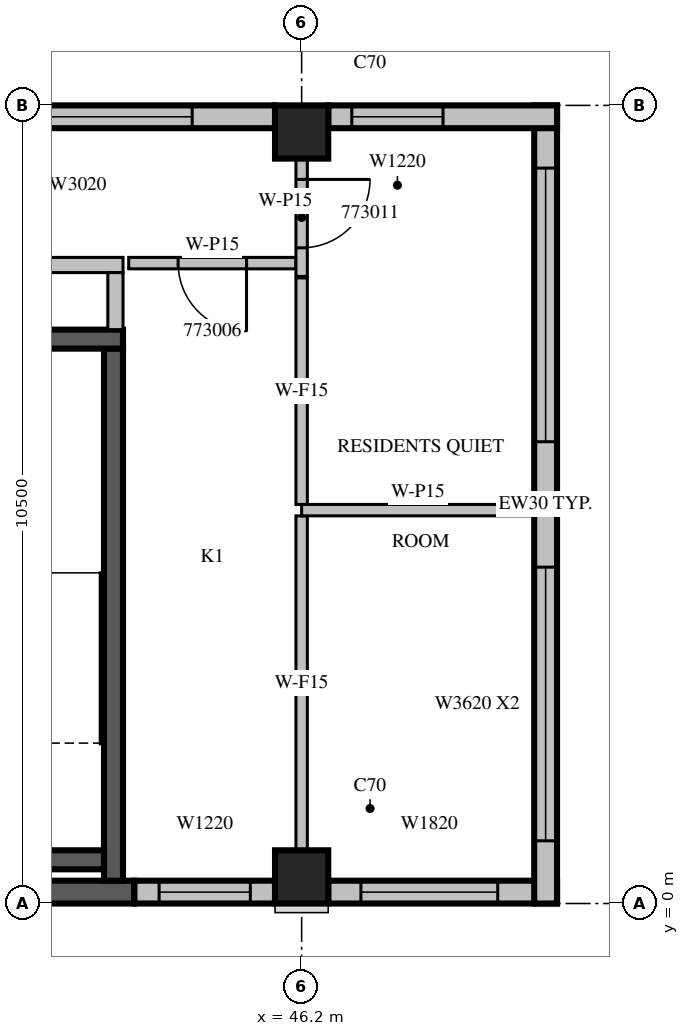
"""IFC4 building model, lengths in metres.
Left out: names, types, materials, properties, quantities, classifications, styles, units other than length and angle.
Written with IfcOpenShell. Run it as: python <this file> out.ifc"""

import sys

from ifc_helpers import new_model, si_unit, direction, frame, frame_2d, origin, origin_2d, place, context, subcontext, project, spatial, rectangle, extrude, source, transform, mapped, element, fill, save


model = new_model("IFC4")
c1 = context("Model", 3, precision=1e-05, world=origin(), true_north=direction((0.0, 1.0)))
c2 = subcontext(c1, "Body", "Model", "MODEL_VIEW")
j1 = project(units=[si_unit("LENGTHUNIT", "METRE"), si_unit("PLANEANGLEUNIT", "RADIAN")], contexts=[c1])
p1 = place(None, origin())
s1 = spatial("IfcSite", under=j1, at=p1, CompositionType="ELEMENT")
p2 = place(p1, origin())
s2 = spatial("IfcBuilding", under=s1, at=p2, CompositionType="ELEMENT")
p3 = place(p2, frame((0.0, 0.0, 316.0)))
s3 = spatial("IfcBuildingStorey", under=s2, at=p3, CompositionType="ELEMENT", Elevation=316.0)
m1 = source(origin(), c2, "Body", "SweptSolid", [
    extrude(rectangle(XDim=0.7, YDim=0.7, at=origin_2d()), origin(), (0.0, 0.0, 1.0), 3.5),
])
for number, where, z_axis, x_axis in (
    (1, (46.2, 0.35, 0.0), (0.0, 0.0, 1.0), (1.0, 0.0, 0.0)),
    (2, (46.2, 10.15, 0.0), (0.0, 0.0, 1.0), (1.0, 0.0, 0.0)),
):
    element("IfcColumn", number, at=place(p3, frame(where, z_axis=z_axis, x_axis=x_axis)), inside=s3, PredefinedType="COLUMN", context=c2, shape_type="MappedRepresentation", body=[
        mapped(m1, transform((0.0, 0.0, 0.0), scale=1.0)),
    ])
m2 = source(origin(), c2, "Body", "SweptSolid", [
    extrude(rectangle(XDim=3.8, YDim=0.3, at=frame_2d((1.9, 0.0))), origin(), (0.0, 0.0, 1.0), 3.1),
])
p4 = place(p3, frame((40.2, 0.15, 0.0), z_axis=(0.0, 0.0, 1.0), x_axis=(1.0, 0.0, 0.0)))
e3 = element("IfcWall", 3, at=p4, inside=s3, PredefinedType="SOLIDWALL", context=c2, shape_type="MappedRepresentation", body=[
    mapped(m2, transform((0.0, 0.0, 0.0), scale=1.0)),
])
m3 = source(origin(), c2, "Body", "SweptSolid", [
    extrude(rectangle(XDim=1.85, YDim=0.3, at=frame_2d((0.925, 0.0))), origin(), (0.0, 0.0, 1.0), 3.1),
])
p5 = place(p3, frame((44.0, 0.15, 0.0), z_axis=(0.0, 0.0, 1.0), x_axis=(1.0, 0.0, 0.0)))
e4 = element("IfcWall", 4, at=p5, inside=s3, PredefinedType="STANDARD", context=c2, shape_type="MappedRepresentation", body=[
    mapped(m3, transform((0.0, 0.0, 0.0), scale=1.0)),
])
m4 = source(origin(), c2, "Body", "SweptSolid", [
    extrude(rectangle(XDim=1.2, YDim=2.0, at=frame_2d((0.6, 1.0))), frame((0.0, 0.16, 0.0), z_axis=(0.0, -1.0, 0.0), x_axis=(1.0, 0.0, 0.0)), (0.0, 0.0, 1.0), 0.32),
])
p6 = place(p5, frame((0.325, 0.0, 0.6)))
e5 = element("IfcOpeningElement", 5, at=p6, cuts=e4, PredefinedType="OPENING", context=c2, shape_type="MappedRepresentation", body=[
    mapped(m4, transform((0.0, 0.0, 0.0), scale=1.0)),
])
m5 = source(origin(), c2, "Body", "SweptSolid", [
    extrude(rectangle(XDim=3.01, YDim=0.3, at=frame_2d((1.505, 0.0))), origin(), (0.0, 0.0, 1.0), 3.1),
])
p7 = place(p3, frame((46.55, 0.15, 0.0), z_axis=(0.0, 0.0, 1.0), x_axis=(1.0, 0.0, 0.0)))
e6 = element("IfcWall", 6, at=p7, inside=s3, PredefinedType="STANDARD", context=c2, shape_type="MappedRepresentation", body=[
    mapped(m5, transform((0.0, 0.0, 0.0), scale=1.0)),
])
m6 = source(origin(), c2, "Body", "SweptSolid", [
    extrude(rectangle(XDim=1.8, YDim=2.0, at=frame_2d((0.9, 1.0))), frame((0.0, 0.16, 0.0), z_axis=(0.0, -1.0, 0.0), x_axis=(1.0, 0.0, 0.0)), (0.0, 0.0, 1.0), 0.32),
])
p8 = place(p7, frame((0.43, 0.0, 0.6)))
e7 = element("IfcOpeningElement", 7, at=p8, cuts=e6, PredefinedType="OPENING", context=c2, shape_type="MappedRepresentation", body=[
    mapped(m6, transform((0.0, 0.0, 0.0), scale=1.0)),
])
m7 = source(origin(), c2, "Body", "SweptSolid", [
    extrude(rectangle(XDim=10.5, YDim=0.3, at=frame_2d((5.25, 0.0))), origin(), (0.0, 0.0, 1.0), 3.1),
])
p9 = place(p3, frame((49.41, 0.0, 0.0), z_axis=(0.0, 0.0, 1.0), x_axis=(0.0, 1.0, 0.0)))
e8 = element("IfcWall", 8, at=p9, inside=s3, PredefinedType="STANDARD", context=c2, shape_type="MappedRepresentation", body=[
    mapped(m7, transform((0.0, 0.0, 0.0), scale=1.0)),
])
m8 = source(origin(), c2, "Body", "SweptSolid", [
    extrude(rectangle(XDim=3.6, YDim=2.0, at=frame_2d((1.8, 1.0))), frame((0.0, 0.16, 0.0), z_axis=(0.0, -1.0, 0.0), x_axis=(1.0, 0.0, 0.0)), (0.0, 0.0, 1.0), 0.32),
])
p10 = place(p9, frame((0.825, 0.0, 0.6)))
e9 = element("IfcOpeningElement", 9, at=p10, cuts=e8, PredefinedType="OPENING", context=c2, shape_type="MappedRepresentation", body=[
    mapped(m8, transform((0.0, 0.0, 0.0), scale=1.0)),
])
p11 = place(p9, frame((6.075, 0.0, 0.6)))
e10 = element("IfcOpeningElement", 10, at=p11, cuts=e8, PredefinedType="OPENING", context=c2, shape_type="MappedRepresentation", body=[
    mapped(m8, transform((0.0, 0.0, 0.0), scale=1.0)),
])
p12 = place(p3, frame((49.56, 10.35, 0.0), z_axis=(0.0, 0.0, 1.0), x_axis=(-1.0, 0.0, 0.0)))
e11 = element("IfcWall", 11, at=p12, inside=s3, PredefinedType="STANDARD", context=c2, shape_type="MappedRepresentation", body=[
    mapped(m5, transform((0.0, 0.0, 0.0), scale=1.0)),
])
p13 = place(p12, frame((1.5, 0.0, 0.6)))
e12 = element("IfcOpeningElement", 12, at=p13, cuts=e11, PredefinedType="OPENING", context=c2, shape_type="MappedRepresentation", body=[
    mapped(m4, transform((0.0, 0.0, 0.0), scale=1.0)),
])
m9 = source(origin(), c2, "Body", "SweptSolid", [
    extrude(rectangle(XDim=7.7, YDim=0.3, at=frame_2d((3.85, 0.0))), origin(), (0.0, 0.0, 1.0), 3.1),
])
p14 = place(p3, frame((45.85, 10.35, 0.0), z_axis=(0.0, 0.0, 1.0), x_axis=(-1.0, 0.0, 0.0)))
e13 = element("IfcWall", 13, at=p14, inside=s3, PredefinedType="STANDARD", context=c2, shape_type="MappedRepresentation", body=[
    mapped(m9, transform((0.0, 0.0, 0.0), scale=1.0)),
])
m10 = source(origin(), c2, "Body", "SweptSolid", [
    extrude(rectangle(XDim=3.0, YDim=2.0, at=frame_2d((1.5, 1.0))), frame((0.0, 0.16, 0.0), z_axis=(0.0, -1.0, 0.0), x_axis=(1.0, 0.0, 0.0)), (0.0, 0.0, 1.0), 0.32),
])
p15 = place(p14, frame((1.09, 0.0, 0.6)))
e14 = element("IfcOpeningElement", 14, at=p15, cuts=e13, PredefinedType="OPENING", context=c2, shape_type="MappedRepresentation", body=[
    mapped(m10, transform((0.0, 0.0, 0.0), scale=1.0)),
])
p16 = place(p14, frame((6.19, 0.0, 0.6)))
e15 = element("IfcOpeningElement", 15, at=p16, cuts=e13, PredefinedType="OPENING", context=c2, shape_type="MappedRepresentation", body=[
    mapped(m4, transform((0.0, 0.0, 0.0), scale=1.0)),
])
m11 = source(origin(), c2, "Body", "SweptSolid", [
    extrude(rectangle(XDim=7.0, YDim=0.25, at=frame_2d((3.5, 0.0))), origin(), (0.0, 0.0, 1.0), 3.1),
])
p17 = place(p3, frame((43.725, 0.3, 0.0), z_axis=(0.0, 0.0, 1.0), x_axis=(0.0, 1.0, 0.0)))
e16 = element("IfcWall", 16, at=p17, inside=s3, PredefinedType="SOLIDWALL", context=c2, shape_type="MappedRepresentation", body=[
    mapped(m11, transform((0.0, 0.0, 0.0), scale=1.0)),
])
m12 = source(origin(), c2, "Body", "SweptSolid", [
    extrude(rectangle(XDim=3.45, YDim=0.25, at=frame_2d((1.725, 0.0))), origin(), (0.0, 0.0, 1.0), 3.1),
])
p18 = place(p3, frame((40.4, 7.425, 0.0), z_axis=(0.0, 0.0, 1.0), x_axis=(1.0, 0.0, 0.0)))
e17 = element("IfcWall", 17, at=p18, inside=s3, PredefinedType="SOLIDWALL", context=c2, shape_type="MappedRepresentation", body=[
    mapped(m12, transform((0.0, 0.0, 0.0), scale=1.0)),
])
m13 = source(origin(), c2, "Body", "SweptSolid", [
    extrude(rectangle(XDim=2.95, YDim=0.25, at=frame_2d((1.475, 0.0))), origin(), (0.0, 0.0, 1.0), 3.1),
])
p19 = place(p3, frame((40.65, 0.575, 0.0), z_axis=(0.0, 0.0, 1.0), x_axis=(1.0, 0.0, 0.0)))
e18 = element("IfcWall", 18, at=p19, inside=s3, PredefinedType="SOLIDWALL", context=c2, shape_type="MappedRepresentation", body=[
    mapped(m13, transform((0.0, 0.0, 0.0), scale=1.0)),
])
m14 = source(origin(), c2, "Body", "SweptSolid", [
    extrude(rectangle(XDim=5.45, YDim=0.2, at=frame_2d((2.725, 0.0))), origin(), (0.0, 0.0, 1.0), 3.1),
])
p20 = place(p3, frame((38.4, 8.4, 0.0), z_axis=(0.0, 0.0, 1.0), x_axis=(1.0, 0.0, 0.0)))
e19 = element("IfcWall", 19, at=p20, inside=s3, PredefinedType="PARTITIONING", context=c2, shape_type="MappedRepresentation", body=[
    mapped(m14, transform((0.0, 0.0, 0.0), scale=1.0)),
])
m15 = source(origin(), c2, "Body", "SweptSolid", [
    extrude(rectangle(XDim=1.2, YDim=2.1, at=frame_2d((0.6, 1.05))), frame((0.0, 0.11, 0.0), z_axis=(0.0, -1.0, 0.0), x_axis=(1.0, 0.0, 0.0)), (0.0, 0.0, 1.0), 0.22),
])
p21 = place(p20, frame((0.4, 0.0, 0.0)))
e20 = element("IfcOpeningElement", 20, at=p21, cuts=e19, PredefinedType="OPENING", context=c2, shape_type="MappedRepresentation", body=[
    mapped(m15, transform((0.0, 0.0, 0.0), scale=1.0)),
])
m16 = source(origin(), c2, "Body", "SweptSolid", [
    extrude(rectangle(XDim=0.9, YDim=2.1, at=frame_2d((0.45, 1.05))), frame((0.0, 0.11, 0.0), z_axis=(0.0, -1.0, 0.0), x_axis=(1.0, 0.0, 0.0)), (0.0, 0.0, 1.0), 0.22),
])
p22 = place(p20, frame((3.25, 0.0, 0.0)))
e21 = element("IfcOpeningElement", 21, at=p22, cuts=e19, PredefinedType="OPENING", context=c2, shape_type="MappedRepresentation", body=[
    mapped(m16, transform((0.0, 0.0, 0.0), scale=1.0)),
])
m17 = source(origin(), c2, "Body", "SweptSolid", [
    extrude(rectangle(XDim=0.75, YDim=0.2, at=frame_2d((0.375, 0.0))), origin(), (0.0, 0.0, 1.0), 3.1),
])
p23 = place(p3, frame((43.75, 7.55, 0.0), z_axis=(0.0, 0.0, 1.0), x_axis=(0.0, 1.0, 0.0)))
e22 = element("IfcWall", 22, at=p23, inside=s3, PredefinedType="PARTITIONING", context=c2, shape_type="MappedRepresentation", body=[
    mapped(m17, transform((0.0, 0.0, 0.0), scale=1.0)),
])
m18 = source(origin(), c2, "Body", "SweptSolid", [
    extrude(rectangle(XDim=2.2, YDim=0.15, at=frame_2d((1.1, 0.0))), origin(), (0.0, 0.0, 1.0), 3.1),
])
p24 = place(p3, frame((46.125, 8.425, 0.0), z_axis=(0.0, 0.0, 1.0), x_axis=(-1.0, 0.0, 0.0)))
e23 = element("IfcWall", 23, at=p24, inside=s3, PredefinedType="PARTITIONING", context=c2, shape_type="MappedRepresentation", body=[
    mapped(m18, transform((0.0, 0.0, 0.0), scale=1.0)),
])
m19 = source(origin(), c2, "Body", "SweptSolid", [
    extrude(rectangle(XDim=0.9, YDim=2.1, at=frame_2d((0.45, 1.05))), frame((0.0, 0.085, 0.0), z_axis=(0.0, -1.0, 0.0), x_axis=(1.0, 0.0, 0.0)), (0.0, 0.0, 1.0), 0.17),
])
p25 = place(p24, frame((0.65, 0.0, 0.0)))
e24 = element("IfcOpeningElement", 24, at=p25, cuts=e23, PredefinedType="OPENING", context=c2, shape_type="MappedRepresentation", body=[
    mapped(m19, transform((0.0, 0.0, 0.0), scale=1.0)),
])
m20 = source(origin(), c2, "Body", "SweptSolid", [
    extrude(rectangle(XDim=1.551, YDim=0.15, at=frame_2d((0.775, 0.0))), origin(), (0.0, 0.0, 1.0), 3.1),
])
p26 = place(p3, frame((46.2, 9.801, 0.0), z_axis=(0.0, 0.0, 1.0), x_axis=(0.0, -1.0, 0.0)))
e25 = element("IfcWall", 25, at=p26, inside=s3, PredefinedType="PARTITIONING", context=c2, shape_type="MappedRepresentation", body=[
    mapped(m20, transform((0.0, 0.0, 0.0), scale=1.0)),
])
p27 = place(p26, frame((0.275, 0.0, 0.0)))
e26 = element("IfcOpeningElement", 26, at=p27, cuts=e25, PredefinedType="OPENING", context=c2, shape_type="MappedRepresentation", body=[
    mapped(m19, transform((0.0, 0.0, 0.0), scale=1.0)),
])
m21 = source(origin(), c2, "Body", "SweptSolid", [
    extrude(rectangle(XDim=4.401, YDim=0.15, at=frame_2d((2.2, 0.0))), origin(), (0.0, 0.0, 1.0), 3.1),
])
p28 = place(p3, frame((46.2, 0.699, 0.0), z_axis=(0.0, 0.0, 1.0), x_axis=(0.0, 1.0, 0.0)))
e27 = element("IfcWall", 27, at=p28, inside=s3, PredefinedType="PARTITIONING", context=c2, shape_type="MappedRepresentation", body=[
    mapped(m21, transform((0.0, 0.0, 0.0), scale=1.0)),
])
p29 = place(p3, frame((46.2, 5.25, 0.0), z_axis=(0.0, 0.0, 1.0), x_axis=(0.0, 1.0, 0.0)))
e28 = element("IfcWall", 28, at=p29, inside=s3, PredefinedType="PARTITIONING", context=c2, shape_type="SweptSolid", body=[
    extrude(rectangle(XDim=2.98, YDim=0.15, at=frame_2d((1.49, 0.0))), origin(), (0.0, 0.0, 1.0), 3.1),
])
m22 = source(origin(), c2, "Body", "SweptSolid", [
    extrude(rectangle(XDim=3.06, YDim=0.15, at=frame_2d((1.53, 0.0))), origin(), (0.0, 0.0, 1.0), 3.1),
])
p30 = place(p3, frame((49.26, 5.175, 0.0), z_axis=(0.0, 0.0, 1.0), x_axis=(-1.0, 0.0, 0.0)))
e29 = element("IfcWall", 29, at=p30, inside=s3, PredefinedType="PARTITIONING", context=c2, shape_type="MappedRepresentation", body=[
    mapped(m22, transform((0.0, 0.0, 0.0), scale=1.0)),
])
m23 = source(origin(), c2, "Body", "SweptSolid", [
    extrude(rectangle(XDim=1.2, YDim=2.0, at=frame_2d((0.6, 1.0))), frame((0.0, 0.03, 0.0), z_axis=(0.0, -1.0, 0.0), x_axis=(1.0, 0.0, 0.0)), (0.0, 0.0, 1.0), 0.06),
])
p31 = place(p6, origin())
e30 = element("IfcWindow", 30, at=p31, inside=s3, PartitioningType="SINGLE_PANEL", PredefinedType="WINDOW", context=c2, shape_type="MappedRepresentation", body=[
    mapped(m23, transform((0.0, 0.0, 0.0), scale=1.0)),
])
fill(e5, e30)
m24 = source(origin(), c2, "Body", "SweptSolid", [
    extrude(rectangle(XDim=1.8, YDim=2.0, at=frame_2d((0.9, 1.0))), frame((0.0, 0.03, 0.0), z_axis=(0.0, -1.0, 0.0), x_axis=(1.0, 0.0, 0.0)), (0.0, 0.0, 1.0), 0.06),
])
p32 = place(p8, origin())
e31 = element("IfcWindow", 31, at=p32, inside=s3, PartitioningType="SINGLE_PANEL", PredefinedType="WINDOW", context=c2, shape_type="MappedRepresentation", body=[
    mapped(m24, transform((0.0, 0.0, 0.0), scale=1.0)),
])
fill(e7, e31)
m25 = source(origin(), c2, "Body", "SweptSolid", [
    extrude(rectangle(XDim=3.6, YDim=2.0, at=frame_2d((1.8, 1.0))), frame((0.0, 0.03, 0.0), z_axis=(0.0, -1.0, 0.0), x_axis=(1.0, 0.0, 0.0)), (0.0, 0.0, 1.0), 0.06),
])
p33 = place(p10, origin())
e32 = element("IfcWindow", 32, at=p33, inside=s3, PartitioningType="SINGLE_PANEL", PredefinedType="WINDOW", context=c2, shape_type="MappedRepresentation", body=[
    mapped(m25, transform((0.0, 0.0, 0.0), scale=1.0)),
])
fill(e9, e32)
p34 = place(p11, origin())
e33 = element("IfcWindow", 33, at=p34, inside=s3, PartitioningType="SINGLE_PANEL", PredefinedType="WINDOW", context=c2, shape_type="MappedRepresentation", body=[
    mapped(m25, transform((0.0, 0.0, 0.0), scale=1.0)),
])
fill(e10, e33)
p35 = place(p13, origin())
e34 = element("IfcWindow", 34, at=p35, inside=s3, PartitioningType="SINGLE_PANEL", PredefinedType="WINDOW", context=c2, shape_type="MappedRepresentation", body=[
    mapped(m23, transform((0.0, 0.0, 0.0), scale=1.0)),
])
fill(e12, e34)
m26 = source(origin(), c2, "Body", "SweptSolid", [
    extrude(rectangle(XDim=3.0, YDim=2.0, at=frame_2d((1.5, 1.0))), frame((0.0, 0.03, 0.0), z_axis=(0.0, -1.0, 0.0), x_axis=(1.0, 0.0, 0.0)), (0.0, 0.0, 1.0), 0.06),
])
p36 = place(p15, origin())
e35 = element("IfcWindow", 35, at=p36, inside=s3, PartitioningType="SINGLE_PANEL", PredefinedType="WINDOW", context=c2, shape_type="MappedRepresentation", body=[
    mapped(m26, transform((0.0, 0.0, 0.0), scale=1.0)),
])
fill(e14, e35)
m27 = source(origin(), c2, "Body", "SweptSolid", [
    extrude(rectangle(XDim=0.9, YDim=2.1, at=frame_2d((0.45, 1.05))), frame((0.0, 0.025, 0.0), z_axis=(0.0, -1.0, 0.0), x_axis=(1.0, 0.0, 0.0)), (0.0, 0.0, 1.0), 0.05),
])
p37 = place(p25, origin())
e36 = element("IfcDoor", 36, at=p37, inside=s3, OperationType="SINGLE_SWING_LEFT", PredefinedType="DOOR", context=c2, shape_type="MappedRepresentation", body=[
    mapped(m27, transform((0.0, 0.0, 0.0), scale=1.0)),
])
fill(e24, e36)
p38 = place(p27, origin())
e37 = element("IfcDoor", 37, at=p38, inside=s3, OperationType="SINGLE_SWING_LEFT", PredefinedType="DOOR", context=c2, shape_type="MappedRepresentation", body=[
    mapped(m27, transform((0.0, 0.0, 0.0), scale=1.0)),
])
fill(e26, e37)
save(model, sys.argv[1])
